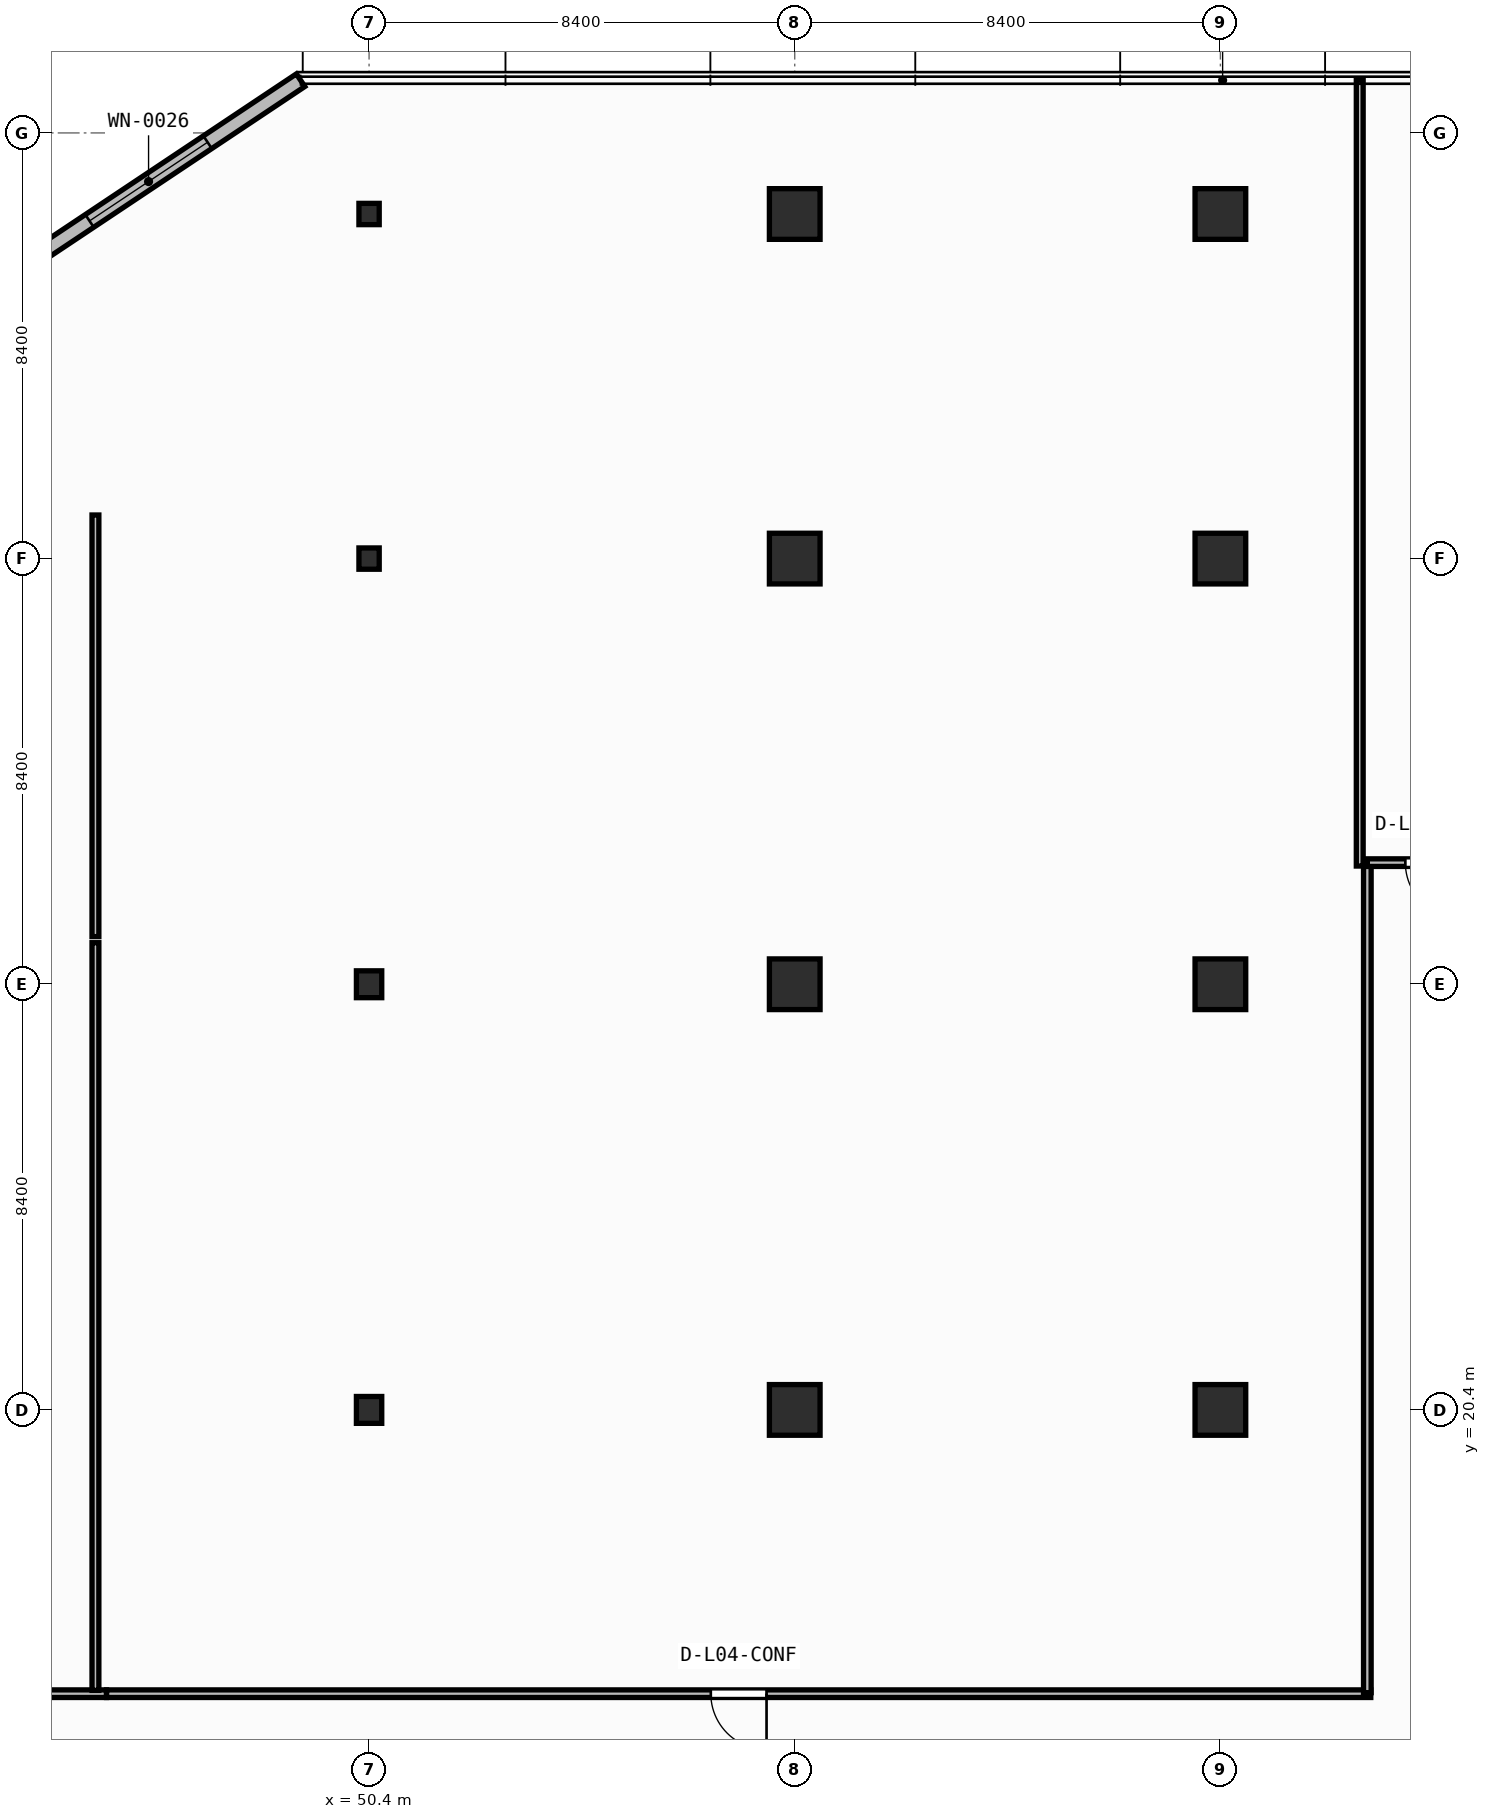
"""IFC4 building model, lengths in metres.
Left out: names, types, materials, properties, quantities, classifications, styles, units other than length and angle.
Written with IfcOpenShell. Run it as: python <this file> out.ifc"""

import sys

from ifc_helpers import new_model, si_unit, direction, frame, frame_2d, origin, origin_2d, place, context, subcontext, project, spatial, rectangle, circle, i_section, extrude, element, fill, save


model = new_model("IFC4")
c1 = context("Model", 3, precision=1e-05, world=origin(), true_north=direction((0.0, 1.0)))
c2 = subcontext(c1, "Body", "Model", "MODEL_VIEW")
j1 = project(units=[si_unit("LENGTHUNIT", "METRE"), si_unit("PLANEANGLEUNIT", "RADIAN")], contexts=[c1])
p1 = place(None, origin())
s1 = spatial("IfcSite", under=j1, at=p1, CompositionType="ELEMENT")
p2 = place(p1, origin())
s2 = spatial("IfcBuilding", under=s1, at=p2, CompositionType="ELEMENT")
p3 = place(p2, frame((0.0, 0.0, 18.0)))
s3 = spatial("IfcBuildingStorey", under=s2, at=p3, CompositionType="ELEMENT", Elevation=18.0)
p4 = place(p3, frame((50.4, 20.4, 0.0), z_axis=(0.0, 0.0, 1.0), x_axis=(1.0, 0.0, 0.0)))
e1 = element("IfcColumn", 1, at=p4, inside=s3, PredefinedType="COLUMN", context=c2, shape_type="SweptSolid", body=[
    extrude(i_section(OverallWidth=0.5, OverallDepth=0.53, WebThickness=0.028, FlangeThickness=0.045, at=origin_2d()), origin(), (0.0, 0.0, 1.0), 4.5),
])
for number, where, z_axis, x_axis in (
    (2, (58.8, 20.4, 0.0), (0.0, 0.0, 1.0), (1.0, 0.0, 0.0)),
    (3, (67.2, 20.4, 0.0), (0.0, 0.0, 1.0), (1.0, 0.0, 0.0)),
):
    element("IfcColumn", number, at=place(p3, frame(where, z_axis=z_axis, x_axis=x_axis)), inside=s3, PredefinedType="COLUMN", context=c2, shape_type="SweptSolid", body=[
        extrude(circle(Radius=0.5, at=origin_2d()), origin(), (0.0, 0.0, 1.0), 4.5),
    ])
p5 = place(p3, frame((50.4, 28.8, 0.0), z_axis=(0.0, 0.0, 1.0), x_axis=(1.0, 0.0, 0.0)))
e4 = element("IfcColumn", 4, at=p5, inside=s3, PredefinedType="COLUMN", context=c2, shape_type="SweptSolid", body=[
    extrude(i_section(OverallWidth=0.5, OverallDepth=0.53, WebThickness=0.028, FlangeThickness=0.045, at=origin_2d()), origin(), (0.0, 0.0, 1.0), 4.5),
])
for number, where, z_axis, x_axis in (
    (5, (58.8, 28.8, 0.0), (0.0, 0.0, 1.0), (1.0, 0.0, 0.0)),
    (6, (67.2, 28.8, 0.0), (0.0, 0.0, 1.0), (1.0, 0.0, 0.0)),
):
    element("IfcColumn", number, at=place(p3, frame(where, z_axis=z_axis, x_axis=x_axis)), inside=s3, PredefinedType="COLUMN", context=c2, shape_type="SweptSolid", body=[
        extrude(circle(Radius=0.5, at=origin_2d()), origin(), (0.0, 0.0, 1.0), 4.5),
    ])
p6 = place(p3, frame((50.4, 37.2, 0.0), z_axis=(0.0, 0.0, 1.0), x_axis=(1.0, 0.0, 0.0)))
e7 = element("IfcColumn", 7, at=p6, inside=s3, PredefinedType="COLUMN", context=c2, shape_type="SweptSolid", body=[
    extrude(i_section(OverallWidth=0.4, OverallDepth=0.42, WebThickness=0.025, FlangeThickness=0.04, at=origin_2d()), origin(), (0.0, 0.0, 1.0), 4.5),
])
for number, where, z_axis, x_axis in (
    (8, (58.8, 37.2, 0.0), (0.0, 0.0, 1.0), (1.0, 0.0, 0.0)),
    (9, (67.2, 37.2, 0.0), (0.0, 0.0, 1.0), (1.0, 0.0, 0.0)),
):
    element("IfcColumn", number, at=place(p3, frame(where, z_axis=z_axis, x_axis=x_axis)), inside=s3, PredefinedType="COLUMN", context=c2, shape_type="SweptSolid", body=[
        extrude(circle(Radius=0.5, at=origin_2d()), origin(), (0.0, 0.0, 1.0), 4.5),
    ])
p7 = place(p3, frame((50.4, 44.0, 0.0), z_axis=(0.0, 0.0, 1.0), x_axis=(1.0, 0.0, 0.0)))
e10 = element("IfcColumn", 10, at=p7, inside=s3, PredefinedType="COLUMN", context=c2, shape_type="SweptSolid", body=[
    extrude(i_section(OverallWidth=0.4, OverallDepth=0.42, WebThickness=0.025, FlangeThickness=0.04, at=origin_2d()), origin(), (0.0, 0.0, 1.0), 4.5),
])
for number, where, z_axis, x_axis in (
    (11, (58.8, 44.0, 0.0), (0.0, 0.0, 1.0), (1.0, 0.0, 0.0)),
    (12, (67.2, 44.0, 0.0), (0.0, 0.0, 1.0), (1.0, 0.0, 0.0)),
):
    element("IfcColumn", number, at=place(p3, frame(where, z_axis=z_axis, x_axis=x_axis)), inside=s3, PredefinedType="COLUMN", context=c2, shape_type="SweptSolid", body=[
        extrude(circle(Radius=0.5, at=origin_2d()), origin(), (0.0, 0.0, 1.0), 4.5),
    ])
p8 = place(p3, frame((49.048, 46.64, 0.0), z_axis=(0.0, 0.0, 1.0), x_axis=(-0.832050294338, -0.554700196225, 0.0)))
e13 = element("IfcWall", 13, at=p8, inside=s3, PredefinedType="STANDARD", context=c2, shape_type="SweptSolid", body=[
    extrude(rectangle(XDim=7.211, YDim=0.3, at=frame_2d((3.605, 0.0))), origin(), (0.0, 0.0, 1.0), 4.08),
])
p9 = place(p8, frame((2.206, 0.0, 0.85)))
e14 = element("IfcOpeningElement", 14, at=p9, cuts=e13, PredefinedType="OPENING", context=c2, shape_type="SweptSolid", body=[
    extrude(rectangle(XDim=2.8, YDim=2.1, at=frame_2d((1.4, 1.05))), frame((0.0, 0.16, 0.0), z_axis=(0.0, -1.0, 0.0), x_axis=(1.0, 0.0, 0.0)), (0.0, 0.0, 1.0), 0.32),
])
p10 = place(p3, frame((45.218, 14.8, 0.0), z_axis=(0.0, 0.0, 1.0), x_axis=(-1.0, 0.0, 0.0)))
e15 = element("IfcWall", 15, at=p10, inside=s3, PredefinedType="PARTITIONING", context=c2, shape_type="SweptSolid", body=[
    extrude(rectangle(XDim=22.998, YDim=0.15, at=frame_2d((11.499, 0.0))), origin(), (0.0, 0.0, 1.0), 4.08),
])
p11 = place(p10, frame((10.949, 0.0, 0.0)))
e16 = element("IfcOpeningElement", 16, at=p11, cuts=e15, PredefinedType="OPENING", context=c2, shape_type="SweptSolid", body=[
    extrude(rectangle(XDim=1.1, YDim=2.1, at=frame_2d((0.55, 1.05))), frame((0.0, 0.085, 0.0), z_axis=(0.0, -1.0, 0.0), x_axis=(1.0, 0.0, 0.0)), (0.0, 0.0, 1.0), 0.17),
])
p12 = place(p3, frame((70.168, 14.8, 0.0), z_axis=(0.0, 0.0, 1.0), x_axis=(-1.0, 0.0, 0.0)))
e17 = element("IfcWall", 17, at=p12, inside=s3, PredefinedType="PARTITIONING", context=c2, shape_type="SweptSolid", body=[
    extrude(rectangle(XDim=24.948, YDim=0.15, at=frame_2d((12.474, 0.0))), origin(), (0.0, 0.0, 1.0), 4.08),
])
p13 = place(p12, frame((11.924, 0.0, 0.0)))
e18 = element("IfcOpeningElement", 18, at=p13, cuts=e17, PredefinedType="OPENING", context=c2, shape_type="SweptSolid", body=[
    extrude(rectangle(XDim=1.1, YDim=2.1, at=frame_2d((0.55, 1.05))), frame((0.0, 0.085, 0.0), z_axis=(0.0, -1.0, 0.0), x_axis=(1.0, 0.0, 0.0)), (0.0, 0.0, 1.0), 0.17),
])
p14 = place(p3, frame((70.1, 31.2, 0.0), z_axis=(0.0, 0.0, 1.0), x_axis=(0.0, -1.0, 0.0)))
e19 = element("IfcWall", 19, at=p14, inside=s3, PredefinedType="PARTITIONING", context=c2, shape_type="SweptSolid", body=[
    extrude(rectangle(XDim=16.38, YDim=0.15, at=frame_2d((8.19, 0.0))), origin(), (0.0, 0.0, 1.0), 4.08),
])
p15 = place(p3, frame((72.7, 31.2, 0.0), z_axis=(0.0, 0.0, 1.0), x_axis=(-1.0, 0.0, 0.0)))
e20 = element("IfcWall", 20, at=p15, inside=s3, PredefinedType="PARTITIONING", context=c2, shape_type="SweptSolid", body=[
    extrude(rectangle(XDim=2.6, YDim=0.15, at=frame_2d((1.3, 0.0))), origin(), (0.0, 0.0, 1.0), 4.08),
])
p16 = place(p15, frame((0.75, 0.0, 0.0)))
e21 = element("IfcOpeningElement", 21, at=p16, cuts=e20, PredefinedType="OPENING", context=c2, shape_type="SweptSolid", body=[
    extrude(rectangle(XDim=1.1, YDim=2.1, at=frame_2d((0.55, 1.05))), frame((0.0, 0.085, 0.0), z_axis=(0.0, -1.0, 0.0), x_axis=(1.0, 0.0, 0.0)), (0.0, 0.0, 1.0), 0.17),
])
p17 = place(p3, frame((45.0, 14.865, 0.0), z_axis=(0.0, 0.0, 1.0), x_axis=(0.0, 1.0, 0.0)))
e22 = element("IfcWall", 22, at=p17, inside=s3, PredefinedType="PARTITIONING", context=c2, shape_type="SweptSolid", body=[
    extrude(rectangle(XDim=14.755, YDim=0.135, at=frame_2d((7.377, 0.0))), origin(), (0.0, 0.0, 1.0), 4.08),
])
p18 = place(p3, frame((45.0, 29.74, 0.0), z_axis=(0.0, 0.0, 1.0), x_axis=(0.0, 1.0, 0.0)))
e23 = element("IfcWall", 23, at=p18, inside=s3, PredefinedType="PARTITIONING", context=c2, shape_type="SweptSolid", body=[
    extrude(rectangle(XDim=8.32, YDim=0.135, at=frame_2d((4.16, 0.0))), origin(), (0.0, 0.0, 1.0), 4.08),
])
p19 = place(p3, frame((69.95, 31.133, 0.0), z_axis=(0.0, 0.0, 1.0), x_axis=(0.0, 1.0, 0.0)))
e24 = element("IfcWall", 24, at=p19, inside=s3, PredefinedType="PARTITIONING", context=c2, shape_type="SweptSolid", body=[
    extrude(rectangle(XDim=15.507, YDim=0.135, at=frame_2d((7.753, 0.0))), origin(), (0.0, 0.0, 1.0), 4.08),
])
p20 = place(p9, origin())
e25 = element("IfcWindow", 25, at=p20, inside=s3, PartitioningType="SINGLE_PANEL", PredefinedType="WINDOW", context=c2, shape_type="SweptSolid", body=[
    extrude(rectangle(XDim=2.8, YDim=2.1, at=frame_2d((1.4, 1.05))), frame((0.0, 0.03, 0.0), z_axis=(0.0, -1.0, 0.0), x_axis=(1.0, 0.0, 0.0)), (0.0, 0.0, 1.0), 0.06),
])
fill(e14, e25)
p21 = place(p13, origin())
e26 = element("IfcDoor", 26, at=p21, inside=s3, OperationType="SINGLE_SWING_LEFT", PredefinedType="DOOR", context=c2, shape_type="SweptSolid", body=[
    extrude(rectangle(XDim=1.1, YDim=2.1, at=frame_2d((0.55, 1.05))), frame((0.0, 0.025, 0.0), z_axis=(0.0, -1.0, 0.0), x_axis=(1.0, 0.0, 0.0)), (0.0, 0.0, 1.0), 0.05),
])
fill(e18, e26)
p22 = place(p16, origin())
e27 = element("IfcDoor", 27, at=p22, inside=s3, OperationType="SINGLE_SWING_LEFT", PredefinedType="DOOR", context=c2, shape_type="SweptSolid", body=[
    extrude(rectangle(XDim=1.1, YDim=2.1, at=frame_2d((0.55, 1.05))), frame((0.0, 0.025, 0.0), z_axis=(0.0, -1.0, 0.0), x_axis=(1.0, 0.0, 0.0)), (0.0, 0.0, 1.0), 0.05),
])
fill(e21, e27)
save(model, sys.argv[1])
